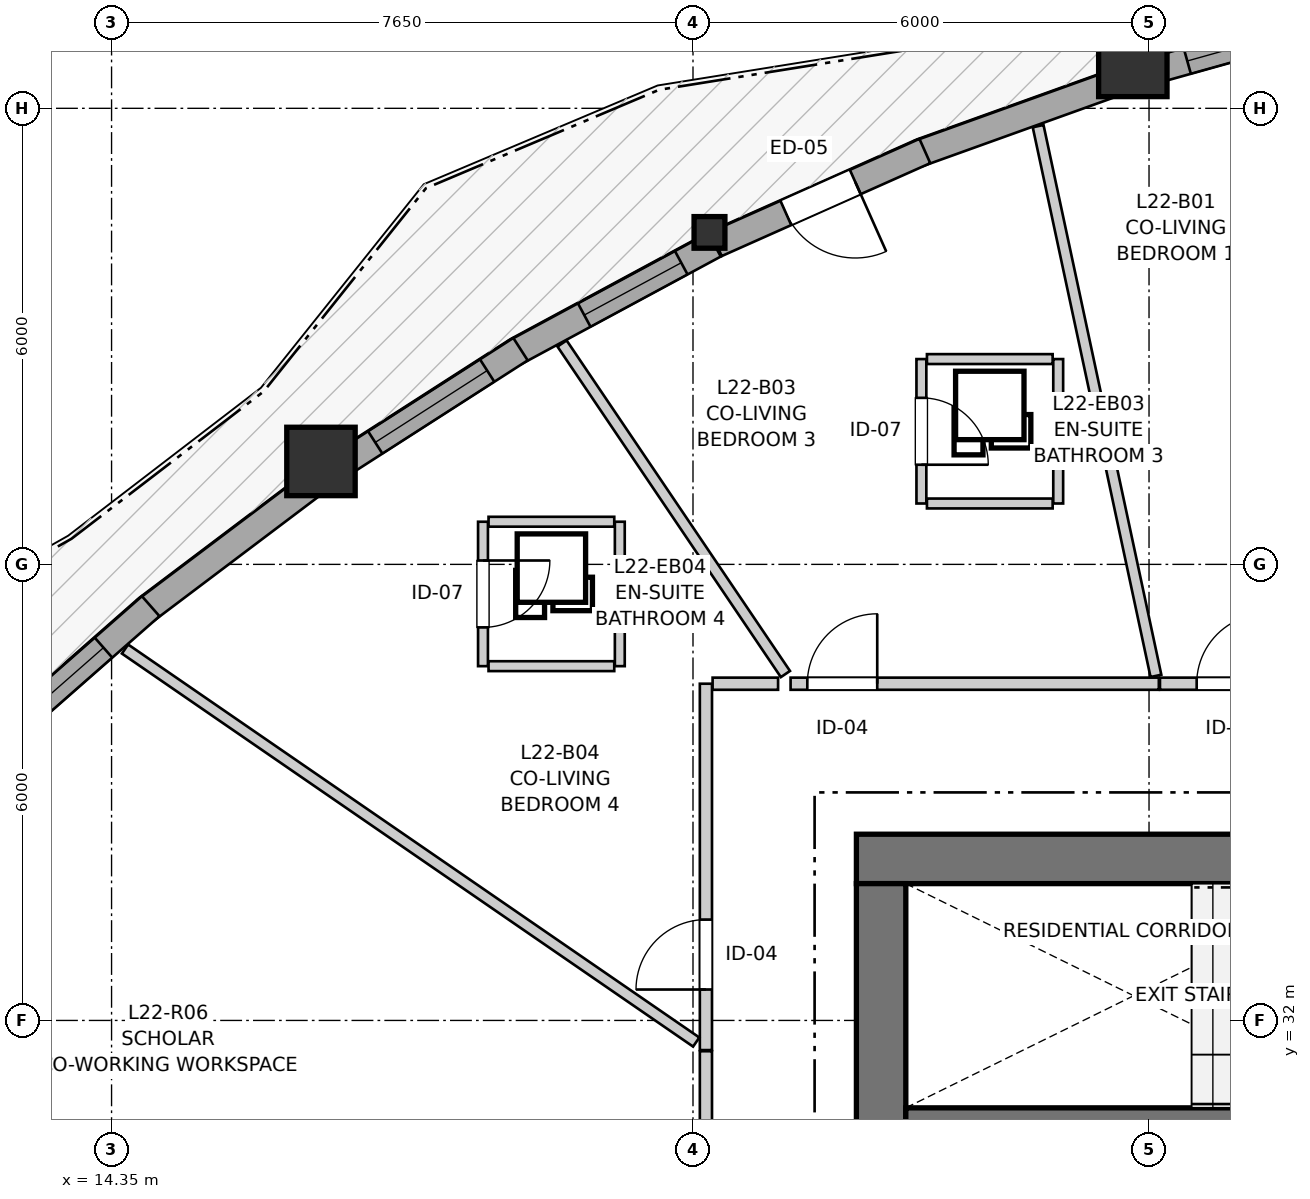
"""IFC4 building model, lengths in metres.
Left out: names, types, materials, properties, quantities, classifications, styles, units other than length and angle.
Written with IfcOpenShell. Run it as: python <this file> out.ifc"""

import sys

from ifc_helpers import new_model, si_unit, direction, frame, frame_2d, origin, origin_2d, place, context, subcontext, project, spatial, rectangle, i_section, extrude, source, transform, mapped, element, fill, save


model = new_model("IFC4")
c1 = context("Model", 3, precision=1e-05, world=origin(), true_north=direction((0.0, 1.0)))
c2 = subcontext(c1, "Body", "Model", "MODEL_VIEW")
j1 = project(units=[si_unit("LENGTHUNIT", "METRE"), si_unit("PLANEANGLEUNIT", "RADIAN")], contexts=[c1])
p1 = place(None, origin())
s1 = spatial("IfcSite", under=j1, at=p1, CompositionType="ELEMENT")
p2 = place(p1, origin())
s2 = spatial("IfcBuilding", under=s1, at=p2, CompositionType="ELEMENT")
p3 = place(p2, frame((0.0, 0.0, 76.8)))
s3 = spatial("IfcBuildingStorey", under=s2, at=p3, CompositionType="ELEMENT", Elevation=76.8)
p4 = place(p3, frame((36.55, 34.125, 0.0), z_axis=(0.0, 0.0, 1.0), x_axis=(-1.0, 0.0, 0.0)))
e1 = element("IfcWall", 1, at=p4, inside=s3, PredefinedType="SHEAR", context=c2, shape_type="SweptSolid", body=[
    extrude(rectangle(XDim=12.4, YDim=0.65, at=frame_2d((6.2, 0.0))), origin(), (0.0, 0.0, 1.0), 2.935),
])
p5 = place(p3, frame((24.475, 33.8, 0.0), z_axis=(0.0, 0.0, 1.0), x_axis=(0.0, -1.0, 0.0)))
e2 = element("IfcWall", 2, at=p5, inside=s3, PredefinedType="SHEAR", context=c2, shape_type="SweptSolid", body=[
    extrude(rectangle(XDim=15.6, YDim=0.65, at=frame_2d((7.8, 0.0))), origin(), (0.0, 0.0, 1.0), 2.935),
])
p6 = place(p5, frame((7.05, 0.0, 0.0)))
e3 = element("IfcOpeningElement", 3, at=p6, cuts=e2, PredefinedType="OPENING", context=c2, shape_type="SweptSolid", body=[
    extrude(rectangle(XDim=1.5, YDim=2.15, at=frame_2d((0.75, 1.075))), frame((0.0, 0.335, 0.0), z_axis=(0.0, -1.0, 0.0), x_axis=(1.0, 0.0, 0.0)), (0.0, 0.0, 1.0), 0.67),
])
p7 = place(p5, frame((3.52, 0.0, 0.0)))
e4 = element("IfcOpeningElement", 4, at=p7, cuts=e2, PredefinedType="OPENING", context=c2, shape_type="SweptSolid", body=[
    extrude(rectangle(XDim=0.86, YDim=2.05, at=frame_2d((0.43, 1.025))), frame((0.0, 0.335, 0.0), z_axis=(0.0, -1.0, 0.0), x_axis=(1.0, 0.0, 0.0)), (0.0, 0.0, 1.0), 0.67),
])
p8 = place(p5, frame((11.22, 0.0, 0.0)))
e5 = element("IfcOpeningElement", 5, at=p8, cuts=e2, PredefinedType="OPENING", context=c2, shape_type="SweptSolid", body=[
    extrude(rectangle(XDim=0.86, YDim=2.05, at=frame_2d((0.43, 1.025))), frame((0.0, 0.335, 0.0), z_axis=(0.0, -1.0, 0.0), x_axis=(1.0, 0.0, 0.0)), (0.0, 0.0, 1.0), 0.67),
])
p9 = place(p3, frame((24.8, 30.7, 0.0), z_axis=(0.0, 0.0, 1.0), x_axis=(1.0, 0.0, 0.0)))
e6 = element("IfcWall", 6, at=p9, inside=s3, PredefinedType="SHEAR", context=c2, shape_type="SweptSolid", body=[
    extrude(rectangle(XDim=11.1, YDim=0.3, at=frame_2d((5.55, 0.0))), origin(), (0.0, 0.0, 1.0), 2.935),
])
p10 = place(p9, frame((6.22, 0.0, 0.0)))
e7 = element("IfcOpeningElement", 7, at=p10, cuts=e6, PredefinedType="OPENING", context=c2, shape_type="SweptSolid", body=[
    extrude(rectangle(XDim=0.98, YDim=2.15, at=frame_2d((0.49, 1.075))), frame((0.0, 0.16, 0.0), z_axis=(0.0, -1.0, 0.0), x_axis=(1.0, 0.0, 0.0)), (0.0, 0.0, 1.0), 0.32),
])
p11 = place(p9, frame((9.15, 0.0, 0.0)))
e8 = element("IfcOpeningElement", 8, at=p11, cuts=e6, PredefinedType="OPENING", context=c2, shape_type="SweptSolid", body=[
    extrude(rectangle(XDim=1.15, YDim=2.15, at=frame_2d((0.575, 1.075))), frame((0.0, 0.16, 0.0), z_axis=(0.0, -1.0, 0.0), x_axis=(1.0, 0.0, 0.0)), (0.0, 0.0, 1.0), 0.32),
])
m1 = source(origin(), c2, "Body", "SweptSolid", [
    extrude(rectangle(XDim=0.9, YDim=0.9, at=origin_2d()), origin(), (0.0, 0.0, 1.0), 2.935),
])
p12 = place(p3, frame((27.787, 44.604, 0.0), z_axis=(0.0, 0.0, 1.0), x_axis=(1.0, 0.0, 0.0)))
e9 = element("IfcColumn", 9, at=p12, inside=s3, PredefinedType="COLUMN", context=c2, shape_type="MappedRepresentation", body=[
    mapped(m1, transform((0.0, 0.0, 0.0), x_axis=(1.0, 0.0, 0.0), y_axis=(0.0, 1.0, 0.0), z_axis=(0.0, 0.0, 1.0), scale=1.0)),
])
m2 = source(origin(), c2, "Body", "SweptSolid", [
    extrude(i_section(OverallWidth=0.406, OverallDepth=0.416, WebThickness=0.027, FlangeThickness=0.044, FilletRadius=0.015, at=origin_2d()), origin(), (0.0, 0.0, 1.0), 2.935),
])
p13 = place(p3, frame((22.217, 42.367, 0.0), z_axis=(0.0, 0.0, 1.0), x_axis=(1.0, 0.0, 0.0)))
e10 = element("IfcColumn", 10, at=p13, inside=s3, PredefinedType="PILASTER", context=c2, shape_type="MappedRepresentation", body=[
    mapped(m2, transform((0.0, 0.0, 0.0), x_axis=(1.0, 0.0, 0.0), y_axis=(0.0, 1.0, 0.0), z_axis=(0.0, 0.0, 1.0), scale=1.0)),
])
p14 = place(p3, frame((17.105, 39.354, 0.0), z_axis=(0.0, 0.0, 1.0), x_axis=(1.0, 0.0, 0.0)))
e11 = element("IfcColumn", 11, at=p14, inside=s3, PredefinedType="COLUMN", context=c2, shape_type="MappedRepresentation", body=[
    mapped(m1, transform((0.0, 0.0, 0.0), x_axis=(1.0, 0.0, 0.0), y_axis=(0.0, 1.0, 0.0), z_axis=(0.0, 0.0, 1.0), scale=1.0)),
])
p15 = place(p3, frame((30.827, 45.272, 0.0), z_axis=(0.0, 0.0, 1.0), x_axis=(-0.963061576901, -0.269281263918, 0.0)))
e12 = element("IfcWall", 12, at=p15, inside=s3, PredefinedType="SOLIDWALL", context=c2, shape_type="SweptSolid", body=[
    extrude(rectangle(XDim=2.883, YDim=0.35, at=frame_2d((1.441, 0.0))), origin(), (0.0, 0.0, 1.0), 2.465),
])
p16 = place(p15, frame((1.163, 0.0, 0.82)))
e13 = element("IfcOpeningElement", 13, at=p16, cuts=e12, PredefinedType="OPENING", context=c2, shape_type="SweptSolid", body=[
    extrude(rectangle(XDim=1.25, YDim=1.35, at=frame_2d((0.625, 0.675))), frame((0.0, 0.185, 0.0), z_axis=(0.0, -1.0, 0.0), x_axis=(1.0, 0.0, 0.0)), (0.0, 0.0, 1.0), 0.37),
])
p17 = place(p3, frame((27.634, 44.363, 0.0), z_axis=(0.0, 0.0, 1.0), x_axis=(-0.941122275829, -0.3380663573, 0.0)))
e14 = element("IfcWall", 14, at=p17, inside=s3, PredefinedType="SOLIDWALL", context=c2, shape_type="SweptSolid", body=[
    extrude(rectangle(XDim=2.833, YDim=0.35, at=frame_2d((1.417, 0.0))), origin(), (0.0, 0.0, 1.0), 2.465),
])
p18 = place(p3, frame((25.051, 43.438, 0.0), z_axis=(0.0, 0.0, 1.0), x_axis=(-0.913435824308, -0.406982794318, 0.0)))
e15 = element("IfcWall", 15, at=p18, inside=s3, PredefinedType="SOLIDWALL", context=c2, shape_type="SweptSolid", body=[
    extrude(rectangle(XDim=3.004, YDim=0.35, at=frame_2d((1.502, 0.0))), origin(), (0.0, 0.0, 1.0), 2.465),
])
p19 = place(p18, frame((1.002, 0.0, 0.0)))
e16 = element("IfcOpeningElement", 16, at=p19, cuts=e15, PredefinedType="OPENING", context=c2, shape_type="SweptSolid", body=[
    extrude(rectangle(XDim=1.0, YDim=2.1, at=frame_2d((0.5, 1.05))), frame((0.0, 0.185, 0.0), z_axis=(0.0, -1.0, 0.0), x_axis=(1.0, 0.0, 0.0)), (0.0, 0.0, 1.0), 0.37),
])
p20 = place(p3, frame((22.282, 42.204, 0.0), z_axis=(0.0, 0.0, 1.0), x_axis=(-0.880100783756, -0.474786910553, 0.0)))
e17 = element("IfcWall", 17, at=p20, inside=s3, PredefinedType="SOLIDWALL", context=c2, shape_type="SweptSolid", body=[
    extrude(rectangle(XDim=2.987, YDim=0.35, at=frame_2d((1.494, 0.0))), origin(), (0.0, 0.0, 1.0), 2.465),
])
p21 = place(p20, frame((0.497, 0.0, 0.82)))
e18 = element("IfcOpeningElement", 18, at=p21, cuts=e17, PredefinedType="OPENING", context=c2, shape_type="SweptSolid", body=[
    extrude(rectangle(XDim=1.45, YDim=1.25, at=frame_2d((0.725, 0.625))), frame((0.0, 0.185, 0.0), z_axis=(0.0, -1.0, 0.0), x_axis=(1.0, 0.0, 0.0)), (0.0, 0.0, 1.0), 0.37),
])
p22 = place(p3, frame((19.73, 40.831, 0.0), z_axis=(0.0, 0.0, 1.0), x_axis=(-0.841577423868, -0.540136500929, 0.0)))
e19 = element("IfcWall", 19, at=p22, inside=s3, PredefinedType="SOLIDWALL", context=c2, shape_type="SweptSolid", body=[
    extrude(rectangle(XDim=2.782, YDim=0.35, at=frame_2d((1.391, 0.0))), origin(), (0.0, 0.0, 1.0), 2.465),
])
p23 = place(p22, frame((0.521, 0.0, 0.82)))
e20 = element("IfcOpeningElement", 20, at=p23, cuts=e19, PredefinedType="OPENING", context=c2, shape_type="SweptSolid", body=[
    extrude(rectangle(XDim=1.75, YDim=1.3, at=frame_2d((0.875, 0.65))), frame((0.0, 0.185, 0.0), z_axis=(0.0, -1.0, 0.0), x_axis=(1.0, 0.0, 0.0)), (0.0, 0.0, 1.0), 0.37),
])
p24 = place(p3, frame((17.031, 39.079, 0.0), z_axis=(0.0, 0.0, 1.0), x_axis=(-0.798385341516, -0.602146864521, 0.0)))
e21 = element("IfcWall", 21, at=p24, inside=s3, PredefinedType="SOLIDWALL", context=c2, shape_type="SweptSolid", body=[
    extrude(rectangle(XDim=2.799, YDim=0.35, at=frame_2d((1.4, 0.0))), origin(), (0.0, 0.0, 1.0), 2.465),
])
p25 = place(p3, frame((14.865, 37.45, 0.0), z_axis=(0.0, 0.0, 1.0), x_axis=(-0.751505335107, -0.659727012715, 0.0)))
e22 = element("IfcWall", 22, at=p25, inside=s3, PredefinedType="SOLIDWALL", context=c2, shape_type="SweptSolid", body=[
    extrude(rectangle(XDim=3.038, YDim=0.35, at=frame_2d((1.519, 0.0))), origin(), (0.0, 0.0, 1.0), 2.465),
])
p26 = place(p25, frame((0.826, 0.0, 0.82)))
e23 = element("IfcOpeningElement", 23, at=p26, cuts=e22, PredefinedType="OPENING", context=c2, shape_type="SweptSolid", body=[
    extrude(rectangle(XDim=1.8, YDim=1.45, at=frame_2d((0.9, 0.725))), frame((0.0, 0.185, 0.0), z_axis=(0.0, -1.0, 0.0), x_axis=(1.0, 0.0, 0.0)), (0.0, 0.0, 1.0), 0.37),
])
p27 = place(p3, frame((23.284, 36.43, 0.0), z_axis=(0.0, 0.0, 1.0), x_axis=(1.0, 0.0, 0.0)))
e24 = element("IfcWall", 24, at=p27, inside=s3, PredefinedType="PARTITIONING", context=c2, shape_type="SweptSolid", body=[
    extrude(rectangle(XDim=4.845, YDim=0.16, at=frame_2d((2.422, 0.0))), origin(), (0.0, 0.0, 1.0), 2.935),
])
p28 = place(p27, frame((0.22, 0.0, 0.0)))
e25 = element("IfcOpeningElement", 25, at=p28, cuts=e24, PredefinedType="OPENING", context=c2, shape_type="SweptSolid", body=[
    extrude(rectangle(XDim=0.92, YDim=2.1, at=frame_2d((0.46, 1.05))), frame((0.0, 0.09, 0.0), z_axis=(0.0, -1.0, 0.0), x_axis=(1.0, 0.0, 0.0)), (0.0, 0.0, 1.0), 0.18),
])
p29 = place(p3, frame((22.17, 31.61, 0.0), z_axis=(0.0, 0.0, 1.0), x_axis=(0.0, 1.0, 0.0)))
e26 = element("IfcWall", 26, at=p29, inside=s3, PredefinedType="PARTITIONING", context=c2, shape_type="SweptSolid", body=[
    extrude(rectangle(XDim=4.82, YDim=0.16, at=frame_2d((2.41, 0.0))), origin(), (0.0, 0.0, 1.0), 2.935),
])
p30 = place(p29, frame((0.797, 0.0, 0.0)))
e27 = element("IfcOpeningElement", 27, at=p30, cuts=e26, PredefinedType="OPENING", context=c2, shape_type="SweptSolid", body=[
    extrude(rectangle(XDim=0.92, YDim=2.1, at=frame_2d((0.46, 1.05))), frame((0.0, 0.09, 0.0), z_axis=(0.0, -1.0, 0.0), x_axis=(1.0, 0.0, 0.0)), (0.0, 0.0, 1.0), 0.18),
])
p31 = place(p3, frame((22.17, 27.85, 0.0), z_axis=(0.0, 0.0, 1.0), x_axis=(0.0, 1.0, 0.0)))
e28 = element("IfcWall", 28, at=p31, inside=s3, PredefinedType="PARTITIONING", context=c2, shape_type="SweptSolid", body=[
    extrude(rectangle(XDim=3.745, YDim=0.16, at=frame_2d((1.873, 0.0))), origin(), (0.0, 0.0, 1.0), 2.935),
])
p32 = place(p31, frame((1.438, 0.0, 0.0)))
e29 = element("IfcOpeningElement", 29, at=p32, cuts=e28, PredefinedType="OPENING", context=c2, shape_type="SweptSolid", body=[
    extrude(rectangle(XDim=0.96, YDim=2.1, at=frame_2d((0.48, 1.05))), frame((0.0, 0.09, 0.0), z_axis=(0.0, -1.0, 0.0), x_axis=(1.0, 0.0, 0.0)), (0.0, 0.0, 1.0), 0.18),
])
p33 = place(p3, frame((28.144, 36.43, 0.0), z_axis=(0.0, 0.0, 1.0), x_axis=(1.0, 0.0, 0.0)))
e30 = element("IfcWall", 30, at=p33, inside=s3, PredefinedType="PARTITIONING", context=c2, shape_type="SweptSolid", body=[
    extrude(rectangle(XDim=1.932, YDim=0.16, at=frame_2d((0.966, 0.0))), origin(), (0.0, 0.0, 1.0), 2.935),
])
p34 = place(p33, frame((0.483, 0.0, 0.0)))
e31 = element("IfcOpeningElement", 31, at=p34, cuts=e30, PredefinedType="OPENING", context=c2, shape_type="SweptSolid", body=[
    extrude(rectangle(XDim=0.92, YDim=2.1, at=frame_2d((0.46, 1.05))), frame((0.0, 0.09, 0.0), z_axis=(0.0, -1.0, 0.0), x_axis=(1.0, 0.0, 0.0)), (0.0, 0.0, 1.0), 0.18),
])
p35 = place(p3, frame((25.005, 40.701, 0.0), z_axis=(0.0, 0.0, 1.0), x_axis=(0.0, -1.0, 0.0)))
e32 = element("IfcWall", 32, at=p35, inside=s3, PredefinedType="PARTITIONING", context=c2, shape_type="SweptSolid", body=[
    extrude(rectangle(XDim=1.9, YDim=0.13, at=frame_2d((0.95, 0.0))), origin(), (0.0, 0.0, 1.0), 2.935),
])
p36 = place(p35, frame((0.51, 0.0, 0.0)))
e33 = element("IfcOpeningElement", 33, at=p36, cuts=e32, PredefinedType="OPENING", context=c2, shape_type="SweptSolid", body=[
    extrude(rectangle(XDim=0.88, YDim=2.05, at=frame_2d((0.44, 1.025))), frame((0.0, 0.075, 0.0), z_axis=(0.0, -1.0, 0.0), x_axis=(1.0, 0.0, 0.0)), (0.0, 0.0, 1.0), 0.15),
])
p37 = place(p3, frame((19.237, 38.561, 0.0), z_axis=(0.0, 0.0, 1.0), x_axis=(0.0, -1.0, 0.0)))
e34 = element("IfcWall", 34, at=p37, inside=s3, PredefinedType="PARTITIONING", context=c2, shape_type="SweptSolid", body=[
    extrude(rectangle(XDim=1.9, YDim=0.13, at=frame_2d((0.95, 0.0))), origin(), (0.0, 0.0, 1.0), 2.935),
])
p38 = place(p37, frame((0.51, 0.0, 0.0)))
e35 = element("IfcOpeningElement", 35, at=p38, cuts=e34, PredefinedType="OPENING", context=c2, shape_type="SweptSolid", body=[
    extrude(rectangle(XDim=0.88, YDim=2.05, at=frame_2d((0.44, 1.025))), frame((0.0, 0.075, 0.0), z_axis=(0.0, -1.0, 0.0), x_axis=(1.0, 0.0, 0.0)), (0.0, 0.0, 1.0), 0.15),
])
p39 = place(p3, frame((14.527, 36.886, 0.0), z_axis=(0.0, 0.0, 1.0), x_axis=(0.823849772282, -0.566808215106, 0.0)))
e36 = element("IfcWall", 36, at=p39, inside=s3, PredefinedType="PARTITIONING", context=c2, shape_type="SweptSolid", body=[
    extrude(rectangle(XDim=9.122, YDim=0.145, at=frame_2d((4.561, 0.0))), origin(), (0.0, 0.0, 1.0), 2.103),
])
p40 = place(p3, frame((26.541, 43.766, 0.0), z_axis=(0.0, 0.0, 1.0), x_axis=(0.209522326513, -0.9778038631, 0.0)))
e37 = element("IfcWall", 37, at=p40, inside=s3, PredefinedType="PARTITIONING", context=c2, shape_type="SweptSolid", body=[
    extrude(rectangle(XDim=7.397, YDim=0.145, at=frame_2d((3.698, 0.0))), origin(), (0.0, 0.0, 1.0), 2.103),
])
p41 = place(p3, frame((20.277, 40.906, 0.0), z_axis=(0.0, 0.0, 1.0), x_axis=(0.559905741259, -0.828556311246, 0.0)))
e38 = element("IfcWall", 38, at=p41, inside=s3, PredefinedType="PARTITIONING", context=c2, shape_type="SweptSolid", body=[
    extrude(rectangle(XDim=5.249, YDim=0.145, at=frame_2d((2.625, 0.0))), origin(), (0.0, 0.0, 1.0), 2.935),
])
p42 = place(p3, frame((26.805, 38.801, 0.0), z_axis=(0.0, 0.0, 1.0), x_axis=(0.0, 1.0, 0.0)))
e39 = element("IfcWall", 39, at=p42, inside=s3, PredefinedType="PARTITIONING", context=c2, shape_type="SweptSolid", body=[
    extrude(rectangle(XDim=1.9, YDim=0.13, at=frame_2d((0.95, 0.0))), origin(), (0.0, 0.0, 1.0), 2.103),
])
p43 = place(p3, frame((21.037, 36.661, 0.0), z_axis=(0.0, 0.0, 1.0), x_axis=(0.0, 1.0, 0.0)))
e40 = element("IfcWall", 40, at=p43, inside=s3, PredefinedType="PARTITIONING", context=c2, shape_type="SweptSolid", body=[
    extrude(rectangle(XDim=1.9, YDim=0.13, at=frame_2d((0.95, 0.0))), origin(), (0.0, 0.0, 1.0), 2.935),
])
for number, where, z_axis, x_axis in (
    (41, (25.078, 40.701, 0.0), (0.0, 0.0, 1.0), (1.0, 0.0, 0.0)),
    (42, (25.078, 38.801, 0.0), (0.0, 0.0, 1.0), (1.0, 0.0, 0.0)),
    (43, (19.31, 38.561, 0.0), (0.0, 0.0, 1.0), (1.0, 0.0, 0.0)),
    (44, (19.31, 36.661, 0.0), (0.0, 0.0, 1.0), (1.0, 0.0, 0.0)),
):
    element("IfcWall", number, at=place(p3, frame(where, z_axis=z_axis, x_axis=x_axis)), inside=s3, PredefinedType="PARTITIONING", context=c2, shape_type="SweptSolid", body=[
        extrude(rectangle(XDim=1.654, YDim=0.13, at=frame_2d((0.827, 0.0))), origin(), (0.0, 0.0, 1.0), 2.935),
    ])
p44 = place(p3, frame((22.258, 36.43, 0.0), z_axis=(0.0, 0.0, 1.0), x_axis=(1.0, 0.0, 0.0)))
e45 = element("IfcWall", 45, at=p44, inside=s3, PredefinedType="PARTITIONING", context=c2, shape_type="SweptSolid", body=[
    extrude(rectangle(XDim=0.861, YDim=0.16, at=frame_2d((0.431, 0.0))), origin(), (0.0, 0.0, 1.0), 2.935),
])
m3 = source(origin(), c2, "Body", "SweptSolid", [
    extrude(rectangle(XDim=1.25, YDim=1.35, at=frame_2d((0.625, 0.675))), frame((0.0, 0.03, 0.0), z_axis=(0.0, -1.0, 0.0), x_axis=(1.0, 0.0, 0.0)), (0.0, 0.0, 1.0), 0.06),
])
p45 = place(p16, origin())
e46 = element("IfcWindow", 46, at=p45, inside=s3, PartitioningType="SINGLE_PANEL", PredefinedType="WINDOW", context=c2, shape_type="MappedRepresentation", body=[
    mapped(m3, transform((0.0, 0.0, 0.0), x_axis=(1.0, 0.0, 0.0), y_axis=(0.0, 1.0, 0.0), z_axis=(0.0, 0.0, 1.0), scale=1.0)),
])
fill(e13, e46)
m4 = source(origin(), c2, "Body", "SweptSolid", [
    extrude(rectangle(XDim=1.45, YDim=1.25, at=frame_2d((0.725, 0.625))), frame((0.0, 0.03, 0.0), z_axis=(0.0, -1.0, 0.0), x_axis=(1.0, 0.0, 0.0)), (0.0, 0.0, 1.0), 0.06),
])
p46 = place(p21, origin())
e47 = element("IfcWindow", 47, at=p46, inside=s3, PartitioningType="SINGLE_PANEL", PredefinedType="WINDOW", context=c2, shape_type="MappedRepresentation", body=[
    mapped(m4, transform((0.0, 0.0, 0.0), x_axis=(1.0, 0.0, 0.0), y_axis=(0.0, 1.0, 0.0), z_axis=(0.0, 0.0, 1.0), scale=1.0)),
])
fill(e18, e47)
m5 = source(origin(), c2, "Body", "SweptSolid", [
    extrude(rectangle(XDim=1.75, YDim=1.3, at=frame_2d((0.875, 0.65))), frame((0.0, 0.03, 0.0), z_axis=(0.0, -1.0, 0.0), x_axis=(1.0, 0.0, 0.0)), (0.0, 0.0, 1.0), 0.06),
])
p47 = place(p23, origin())
e48 = element("IfcWindow", 48, at=p47, inside=s3, PartitioningType="SINGLE_PANEL", PredefinedType="WINDOW", context=c2, shape_type="MappedRepresentation", body=[
    mapped(m5, transform((0.0, 0.0, 0.0), x_axis=(1.0, 0.0, 0.0), y_axis=(0.0, 1.0, 0.0), z_axis=(0.0, 0.0, 1.0), scale=1.0)),
])
fill(e20, e48)
m6 = source(origin(), c2, "Body", "SweptSolid", [
    extrude(rectangle(XDim=1.8, YDim=1.45, at=frame_2d((0.9, 0.725))), frame((0.0, 0.03, 0.0), z_axis=(0.0, -1.0, 0.0), x_axis=(1.0, 0.0, 0.0)), (0.0, 0.0, 1.0), 0.06),
])
p48 = place(p26, origin())
e49 = element("IfcWindow", 49, at=p48, inside=s3, PartitioningType="SINGLE_PANEL", PredefinedType="WINDOW", context=c2, shape_type="MappedRepresentation", body=[
    mapped(m6, transform((0.0, 0.0, 0.0), x_axis=(1.0, 0.0, 0.0), y_axis=(0.0, 1.0, 0.0), z_axis=(0.0, 0.0, 1.0), scale=1.0)),
])
fill(e23, e49)
m7 = source(origin(), c2, "Body", "SweptSolid", [
    extrude(rectangle(XDim=1.0, YDim=2.1, at=frame_2d((0.5, 1.05))), frame((0.0, 0.025, 0.0), z_axis=(0.0, -1.0, 0.0), x_axis=(1.0, 0.0, 0.0)), (0.0, 0.0, 1.0), 0.05),
])
p49 = place(p19, origin())
e50 = element("IfcDoor", 50, at=p49, inside=s3, OperationType="SINGLE_SWING_LEFT", PredefinedType="DOOR", context=c2, shape_type="MappedRepresentation", body=[
    mapped(m7, transform((0.0, 0.0, 0.0), x_axis=(1.0, 0.0, 0.0), y_axis=(0.0, 1.0, 0.0), z_axis=(0.0, 0.0, 1.0), scale=1.0)),
])
fill(e16, e50)
m8 = source(origin(), c2, "Body", "SweptSolid", [
    extrude(rectangle(XDim=0.92, YDim=2.1, at=frame_2d((0.46, 1.05))), frame((0.0, 0.025, 0.0), z_axis=(0.0, -1.0, 0.0), x_axis=(1.0, 0.0, 0.0)), (0.0, 0.0, 1.0), 0.05),
])
p50 = place(p28, origin())
e51 = element("IfcDoor", 51, at=p50, inside=s3, OperationType="SINGLE_SWING_RIGHT", PredefinedType="DOOR", context=c2, shape_type="MappedRepresentation", body=[
    mapped(m8, transform((0.0, 0.0, 0.0), x_axis=(1.0, 0.0, 0.0), y_axis=(0.0, 1.0, 0.0), z_axis=(0.0, 0.0, 1.0), scale=1.0)),
])
fill(e25, e51)
p51 = place(p30, origin())
e52 = element("IfcDoor", 52, at=p51, inside=s3, OperationType="SINGLE_SWING_LEFT", PredefinedType="DOOR", context=c2, shape_type="MappedRepresentation", body=[
    mapped(m8, transform((0.0, 0.0, 0.0), x_axis=(1.0, 0.0, 0.0), y_axis=(0.0, 1.0, 0.0), z_axis=(0.0, 0.0, 1.0), scale=1.0)),
])
fill(e27, e52)
p52 = place(p34, origin())
e53 = element("IfcDoor", 53, at=p52, inside=s3, OperationType="SINGLE_SWING_RIGHT", PredefinedType="DOOR", context=c2, shape_type="MappedRepresentation", body=[
    mapped(m8, transform((0.0, 0.0, 0.0), x_axis=(1.0, 0.0, 0.0), y_axis=(0.0, 1.0, 0.0), z_axis=(0.0, 0.0, 1.0), scale=1.0)),
])
fill(e31, e53)
m9 = source(origin(), c2, "Body", "SweptSolid", [
    extrude(rectangle(XDim=0.88, YDim=2.05, at=frame_2d((0.44, 1.025))), frame((0.0, 0.025, 0.0), z_axis=(0.0, -1.0, 0.0), x_axis=(1.0, 0.0, 0.0)), (0.0, 0.0, 1.0), 0.05),
])
p53 = place(p36, origin())
e54 = element("IfcDoor", 54, at=p53, inside=s3, OperationType="SINGLE_SWING_RIGHT", PredefinedType="DOOR", context=c2, shape_type="MappedRepresentation", body=[
    mapped(m9, transform((0.0, 0.0, 0.0), x_axis=(1.0, 0.0, 0.0), y_axis=(0.0, 1.0, 0.0), z_axis=(0.0, 0.0, 1.0), scale=1.0)),
])
fill(e33, e54)
p54 = place(p38, origin())
e55 = element("IfcDoor", 55, at=p54, inside=s3, OperationType="SINGLE_SWING_LEFT", PredefinedType="DOOR", context=c2, shape_type="MappedRepresentation", body=[
    mapped(m9, transform((0.0, 0.0, 0.0), x_axis=(1.0, 0.0, 0.0), y_axis=(0.0, 1.0, 0.0), z_axis=(0.0, 0.0, 1.0), scale=1.0)),
])
fill(e35, e55)
save(model, sys.argv[1])
